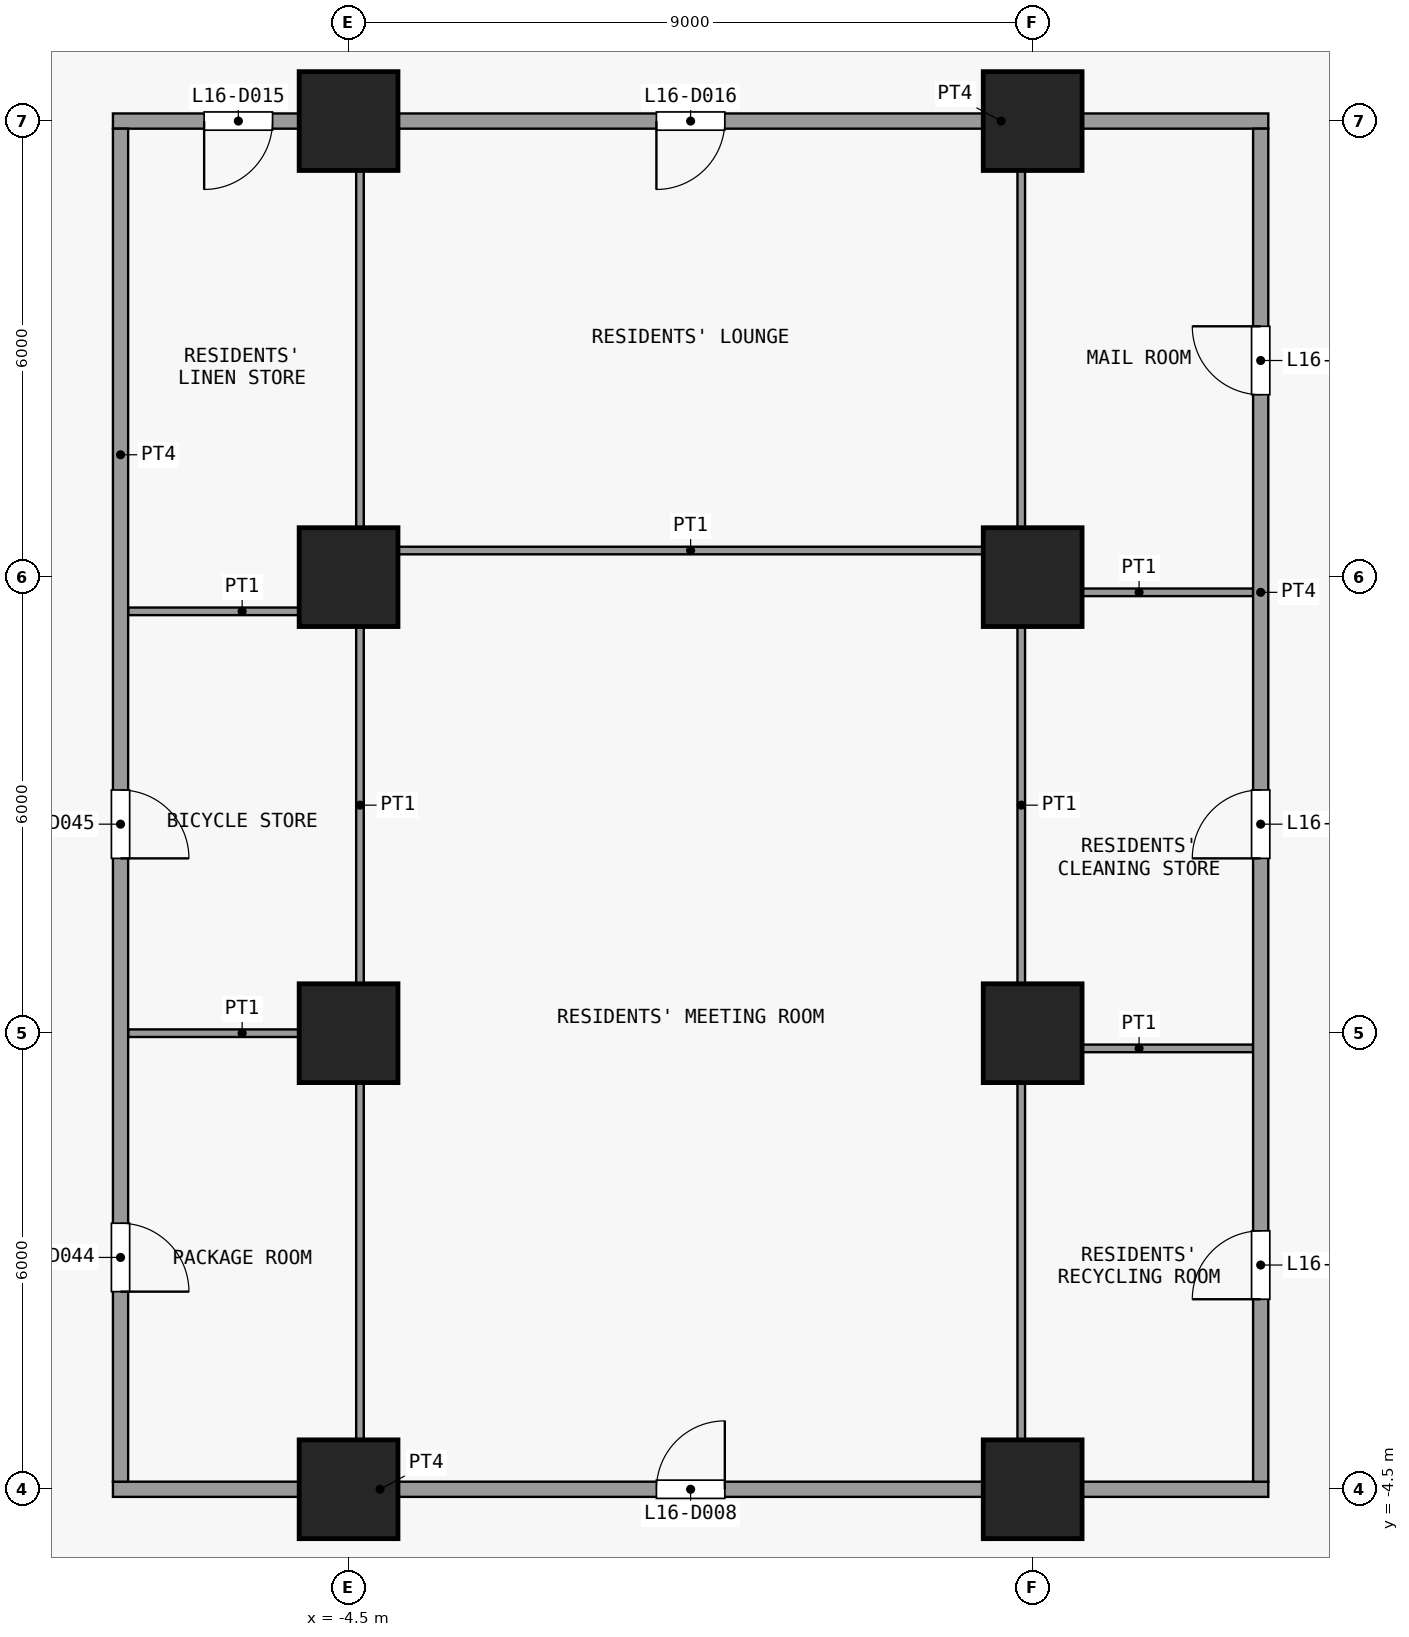
"""IFC4 building model, lengths in metres.
Left out: names, types, materials, properties, quantities, classifications, styles, units other than length and angle.
Written with IfcOpenShell. Run it as: python <this file> out.ifc"""

import sys

from ifc_helpers import new_model, si_unit, direction, frame, frame_2d, origin, origin_2d, place, context, subcontext, project, spatial, rectangle, extrude, element, fill, save


model = new_model("IFC4")
c1 = context("Model", 3, precision=1e-05, world=origin(), true_north=direction((0.0, 1.0)))
c2 = subcontext(c1, "Body", "Model", "MODEL_VIEW")
j1 = project(units=[si_unit("LENGTHUNIT", "METRE"), si_unit("PLANEANGLEUNIT", "RADIAN")], contexts=[c1])
p1 = place(None, origin())
s1 = spatial("IfcSite", under=j1, at=p1, CompositionType="ELEMENT")
p2 = place(p1, origin())
s2 = spatial("IfcBuilding", under=s1, at=p2, CompositionType="ELEMENT")
p3 = place(p2, frame((0.0, 0.0, 68.5)))
s3 = spatial("IfcBuildingStorey", under=s2, at=p3, CompositionType="ELEMENT", Elevation=68.5)
for number, where, z_axis, x_axis in (
    (1, (-4.5, -4.5, 0.0), (0.0, 0.0, 1.0), (1.0, 0.0, 0.0)),
    (2, (-4.5, 1.5, 0.0), (0.0, 0.0, 1.0), (1.0, 0.0, 0.0)),
    (3, (-4.5, 7.5, 0.0), (0.0, 0.0, 1.0), (1.0, 0.0, 0.0)),
    (4, (-4.5, 13.5, 0.0), (0.0, 0.0, 1.0), (1.0, 0.0, 0.0)),
    (5, (4.5, -4.5, 0.0), (0.0, 0.0, 1.0), (1.0, 0.0, 0.0)),
    (6, (4.5, 1.5, 0.0), (0.0, 0.0, 1.0), (1.0, 0.0, 0.0)),
    (7, (4.5, 7.5, 0.0), (0.0, 0.0, 1.0), (1.0, 0.0, 0.0)),
    (8, (4.5, 13.5, 0.0), (0.0, 0.0, 1.0), (1.0, 0.0, 0.0)),
):
    element("IfcColumn", number, at=place(p3, frame(where, z_axis=z_axis, x_axis=x_axis)), inside=s3, PredefinedType="COLUMN", context=c2, shape_type="SweptSolid", body=[
        extrude(rectangle(XDim=1.3, YDim=1.3, at=origin_2d()), origin(), (0.0, 0.0, 1.0), 3.6),
    ])
p4 = place(p3, frame((-7.6, -4.5, 0.0), z_axis=(0.0, 0.0, 1.0), x_axis=(1.0, 0.0, 0.0)))
e9 = element("IfcWall", 9, at=p4, inside=s3, PredefinedType="PARTITIONING", context=c2, shape_type="SweptSolid", body=[
    extrude(rectangle(XDim=15.2, YDim=0.2, at=frame_2d((7.6, 0.0))), origin(), (0.0, 0.0, 1.0), 3.3),
])
p5 = place(p4, frame((7.15, 0.0, 0.0)))
e10 = element("IfcOpeningElement", 10, at=p5, cuts=e9, PredefinedType="OPENING", context=c2, shape_type="SweptSolid", body=[
    extrude(rectangle(XDim=0.9, YDim=2.1, at=frame_2d((0.45, 1.05))), frame((0.0, 0.11, 0.0), z_axis=(0.0, -1.0, 0.0), x_axis=(1.0, 0.0, 0.0)), (0.0, 0.0, 1.0), 0.22),
])
for number, where, z_axis, x_axis in (
    (11, (4.4, 1.3, 0.0), (0.0, 0.0, 1.0), (1.0, 0.0, 0.0)),
    (12, (-7.4, 1.5, 0.0), (0.0, 0.0, 1.0), (1.0, 0.0, 0.0)),
    (13, (-7.4, 7.05, 0.0), (0.0, 0.0, 1.0), (1.0, 0.0, 0.0)),
    (14, (4.4, 7.3, 0.0), (0.0, 0.0, 1.0), (1.0, 0.0, 0.0)),
):
    element("IfcWall", number, at=place(p3, frame(where, z_axis=z_axis, x_axis=x_axis)), inside=s3, PredefinedType="PARTITIONING", context=c2, shape_type="SweptSolid", body=[
        extrude(rectangle(XDim=3.0, YDim=0.1, at=frame_2d((1.5, 0.0))), origin(), (0.0, 0.0, 1.0), 3.3),
    ])
p6 = place(p3, frame((-4.3, 7.85, 0.0), z_axis=(0.0, 0.0, 1.0), x_axis=(1.0, 0.0, 0.0)))
e15 = element("IfcWall", 15, at=p6, inside=s3, PredefinedType="PARTITIONING", context=c2, shape_type="SweptSolid", body=[
    extrude(rectangle(XDim=8.6, YDim=0.1, at=frame_2d((4.3, 0.0))), origin(), (0.0, 0.0, 1.0), 3.3),
])
p7 = place(p3, frame((-7.6, 13.5, 0.0), z_axis=(0.0, 0.0, 1.0), x_axis=(1.0, 0.0, 0.0)))
e16 = element("IfcWall", 16, at=p7, inside=s3, PredefinedType="PARTITIONING", context=c2, shape_type="SweptSolid", body=[
    extrude(rectangle(XDim=15.2, YDim=0.2, at=frame_2d((7.6, 0.0))), origin(), (0.0, 0.0, 1.0), 3.3),
])
p8 = place(p7, frame((1.2, 0.0, 0.0)))
e17 = element("IfcOpeningElement", 17, at=p8, cuts=e16, PredefinedType="OPENING", context=c2, shape_type="SweptSolid", body=[
    extrude(rectangle(XDim=0.9, YDim=2.1, at=frame_2d((0.45, 1.05))), frame((0.0, 0.11, 0.0), z_axis=(0.0, -1.0, 0.0), x_axis=(1.0, 0.0, 0.0)), (0.0, 0.0, 1.0), 0.22),
])
p9 = place(p7, frame((7.15, 0.0, 0.0)))
e18 = element("IfcOpeningElement", 18, at=p9, cuts=e16, PredefinedType="OPENING", context=c2, shape_type="SweptSolid", body=[
    extrude(rectangle(XDim=0.9, YDim=2.1, at=frame_2d((0.45, 1.05))), frame((0.0, 0.11, 0.0), z_axis=(0.0, -1.0, 0.0), x_axis=(1.0, 0.0, 0.0)), (0.0, 0.0, 1.0), 0.22),
])
p10 = place(p3, frame((-7.5, -4.4, 0.0), z_axis=(0.0, 0.0, 1.0), x_axis=(0.0, 1.0, 0.0)))
e19 = element("IfcWall", 19, at=p10, inside=s3, PredefinedType="PARTITIONING", context=c2, shape_type="SweptSolid", body=[
    extrude(rectangle(XDim=17.8, YDim=0.2, at=frame_2d((8.9, 0.0))), origin(), (0.0, 0.0, 1.0), 3.3),
])
p11 = place(p10, frame((2.5, 0.0, 0.0)))
e20 = element("IfcOpeningElement", 20, at=p11, cuts=e19, PredefinedType="OPENING", context=c2, shape_type="SweptSolid", body=[
    extrude(rectangle(XDim=0.9, YDim=2.1, at=frame_2d((0.45, 1.05))), frame((0.0, 0.11, 0.0), z_axis=(0.0, -1.0, 0.0), x_axis=(1.0, 0.0, 0.0)), (0.0, 0.0, 1.0), 0.22),
])
p12 = place(p10, frame((8.2, 0.0, 0.0)))
e21 = element("IfcOpeningElement", 21, at=p12, cuts=e19, PredefinedType="OPENING", context=c2, shape_type="SweptSolid", body=[
    extrude(rectangle(XDim=0.9, YDim=2.1, at=frame_2d((0.45, 1.05))), frame((0.0, 0.11, 0.0), z_axis=(0.0, -1.0, 0.0), x_axis=(1.0, 0.0, 0.0)), (0.0, 0.0, 1.0), 0.22),
])
for number, where, z_axis, x_axis in (
    (22, (-4.35, -4.4, 0.0), (0.0, 0.0, 1.0), (0.0, 1.0, 0.0)),
    (23, (4.35, -4.4, 0.0), (0.0, 0.0, 1.0), (0.0, 1.0, 0.0)),
):
    element("IfcWall", number, at=place(p3, frame(where, z_axis=z_axis, x_axis=x_axis)), inside=s3, PredefinedType="PARTITIONING", context=c2, shape_type="SweptSolid", body=[
        extrude(rectangle(XDim=17.8, YDim=0.1, at=frame_2d((8.9, 0.0))), origin(), (0.0, 0.0, 1.0), 3.3),
    ])
p13 = place(p3, frame((7.5, -4.4, 0.0), z_axis=(0.0, 0.0, 1.0), x_axis=(0.0, 1.0, 0.0)))
e24 = element("IfcWall", 24, at=p13, inside=s3, PredefinedType="PARTITIONING", context=c2, shape_type="SweptSolid", body=[
    extrude(rectangle(XDim=17.8, YDim=0.2, at=frame_2d((8.9, 0.0))), origin(), (0.0, 0.0, 1.0), 3.3),
])
p14 = place(p13, frame((2.4, 0.0, 0.0)))
e25 = element("IfcOpeningElement", 25, at=p14, cuts=e24, PredefinedType="OPENING", context=c2, shape_type="SweptSolid", body=[
    extrude(rectangle(XDim=0.9, YDim=2.1, at=frame_2d((0.45, 1.05))), frame((0.0, 0.11, 0.0), z_axis=(0.0, -1.0, 0.0), x_axis=(1.0, 0.0, 0.0)), (0.0, 0.0, 1.0), 0.22),
])
p15 = place(p13, frame((8.2, 0.0, 0.0)))
e26 = element("IfcOpeningElement", 26, at=p15, cuts=e24, PredefinedType="OPENING", context=c2, shape_type="SweptSolid", body=[
    extrude(rectangle(XDim=0.9, YDim=2.1, at=frame_2d((0.45, 1.05))), frame((0.0, 0.11, 0.0), z_axis=(0.0, -1.0, 0.0), x_axis=(1.0, 0.0, 0.0)), (0.0, 0.0, 1.0), 0.22),
])
p16 = place(p13, frame((14.3, 0.0, 0.0)))
e27 = element("IfcOpeningElement", 27, at=p16, cuts=e24, PredefinedType="OPENING", context=c2, shape_type="SweptSolid", body=[
    extrude(rectangle(XDim=0.9, YDim=2.1, at=frame_2d((0.45, 1.05))), frame((0.0, 0.11, 0.0), z_axis=(0.0, -1.0, 0.0), x_axis=(1.0, 0.0, 0.0)), (0.0, 0.0, 1.0), 0.22),
])
p17 = place(p5, origin())
e28 = element("IfcDoor", 28, at=p17, inside=s3, OperationType="SINGLE_SWING_LEFT", PredefinedType="DOOR", context=c2, shape_type="SweptSolid", body=[
    extrude(rectangle(XDim=0.9, YDim=2.1, at=frame_2d((0.45, 1.05))), frame((0.0, 0.025, 0.0), z_axis=(0.0, -1.0, 0.0), x_axis=(1.0, 0.0, 0.0)), (0.0, 0.0, 1.0), 0.05),
])
fill(e10, e28)
p18 = place(p8, origin())
e29 = element("IfcDoor", 29, at=p18, inside=s3, OperationType="SINGLE_SWING_LEFT", PredefinedType="DOOR", context=c2, shape_type="SweptSolid", body=[
    extrude(rectangle(XDim=0.9, YDim=2.1, at=frame_2d((0.45, 1.05))), frame((0.0, 0.025, 0.0), z_axis=(0.0, -1.0, 0.0), x_axis=(1.0, 0.0, 0.0)), (0.0, 0.0, 1.0), 0.05),
])
fill(e17, e29)
p19 = place(p9, origin())
e30 = element("IfcDoor", 30, at=p19, inside=s3, OperationType="SINGLE_SWING_LEFT", PredefinedType="DOOR", context=c2, shape_type="SweptSolid", body=[
    extrude(rectangle(XDim=0.9, YDim=2.1, at=frame_2d((0.45, 1.05))), frame((0.0, 0.025, 0.0), z_axis=(0.0, -1.0, 0.0), x_axis=(1.0, 0.0, 0.0)), (0.0, 0.0, 1.0), 0.05),
])
fill(e18, e30)
p20 = place(p11, origin())
e31 = element("IfcDoor", 31, at=p20, inside=s3, OperationType="SINGLE_SWING_LEFT", PredefinedType="DOOR", context=c2, shape_type="SweptSolid", body=[
    extrude(rectangle(XDim=0.9, YDim=2.1, at=frame_2d((0.45, 1.05))), frame((0.0, 0.025, 0.0), z_axis=(0.0, -1.0, 0.0), x_axis=(1.0, 0.0, 0.0)), (0.0, 0.0, 1.0), 0.05),
])
fill(e20, e31)
p21 = place(p12, origin())
e32 = element("IfcDoor", 32, at=p21, inside=s3, OperationType="SINGLE_SWING_LEFT", PredefinedType="DOOR", context=c2, shape_type="SweptSolid", body=[
    extrude(rectangle(XDim=0.9, YDim=2.1, at=frame_2d((0.45, 1.05))), frame((0.0, 0.025, 0.0), z_axis=(0.0, -1.0, 0.0), x_axis=(1.0, 0.0, 0.0)), (0.0, 0.0, 1.0), 0.05),
])
fill(e21, e32)
p22 = place(p14, origin())
e33 = element("IfcDoor", 33, at=p22, inside=s3, OperationType="SINGLE_SWING_RIGHT", PredefinedType="DOOR", context=c2, shape_type="SweptSolid", body=[
    extrude(rectangle(XDim=0.9, YDim=2.1, at=frame_2d((0.45, 1.05))), frame((0.0, 0.025, 0.0), z_axis=(0.0, -1.0, 0.0), x_axis=(1.0, 0.0, 0.0)), (0.0, 0.0, 1.0), 0.05),
])
fill(e25, e33)
p23 = place(p15, origin())
e34 = element("IfcDoor", 34, at=p23, inside=s3, OperationType="SINGLE_SWING_RIGHT", PredefinedType="DOOR", context=c2, shape_type="SweptSolid", body=[
    extrude(rectangle(XDim=0.9, YDim=2.1, at=frame_2d((0.45, 1.05))), frame((0.0, 0.025, 0.0), z_axis=(0.0, -1.0, 0.0), x_axis=(1.0, 0.0, 0.0)), (0.0, 0.0, 1.0), 0.05),
])
fill(e26, e34)
p24 = place(p16, origin())
e35 = element("IfcDoor", 35, at=p24, inside=s3, OperationType="SINGLE_SWING_LEFT", PredefinedType="DOOR", context=c2, shape_type="SweptSolid", body=[
    extrude(rectangle(XDim=0.9, YDim=2.1, at=frame_2d((0.45, 1.05))), frame((0.0, 0.025, 0.0), z_axis=(0.0, -1.0, 0.0), x_axis=(1.0, 0.0, 0.0)), (0.0, 0.0, 1.0), 0.05),
])
fill(e27, e35)
save(model, sys.argv[1])
